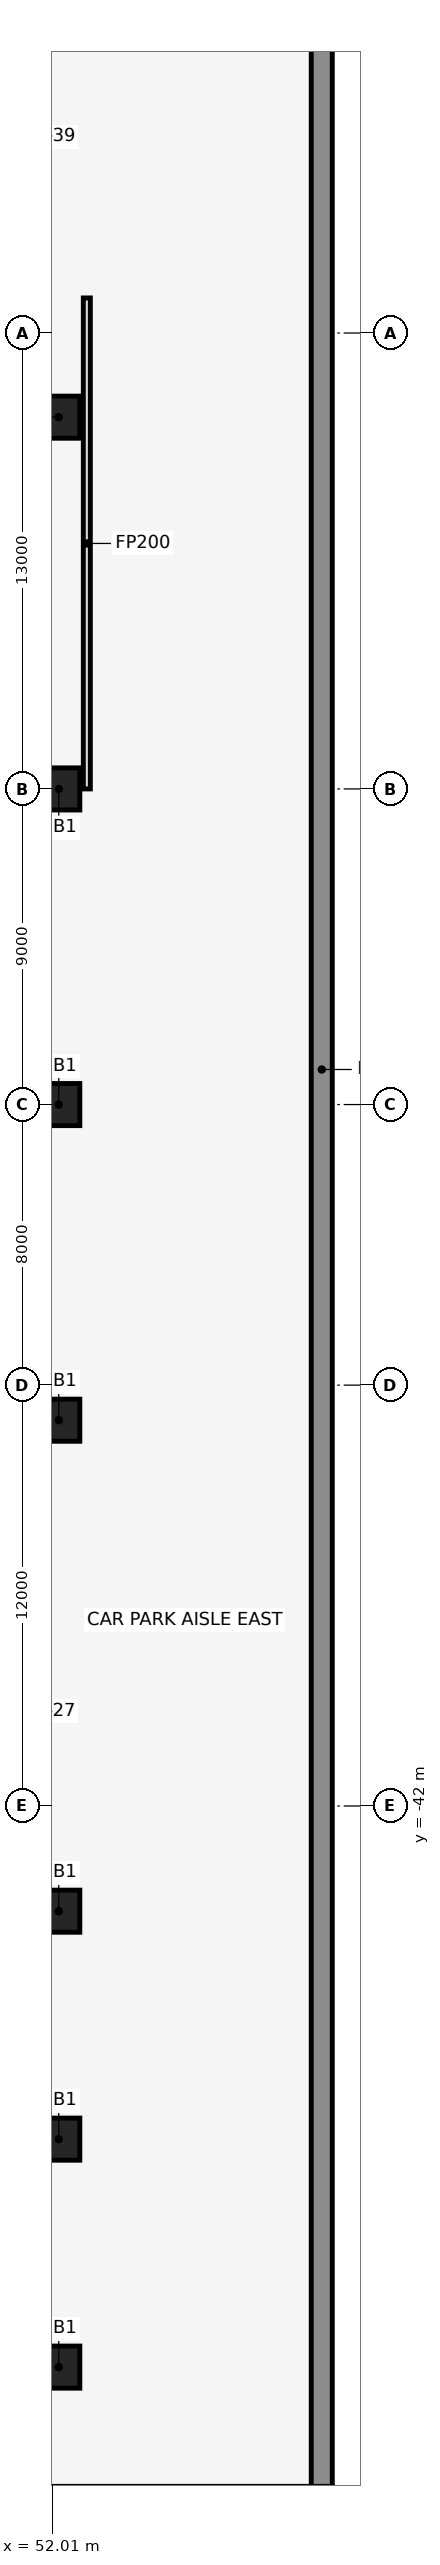
"""IFC4 building model, lengths in metres.
Left out: names, types, materials, properties, quantities, classifications, styles, units other than length and angle.
Written with IfcOpenShell. Run it as: python <this file> out.ifc"""

import sys

from ifc_helpers import new_model, si_unit, direction, frame, frame_2d, origin, origin_2d, place, context, subcontext, project, spatial, rectangle, extrude, element, save


model = new_model("IFC4")
c1 = context("Model", 3, precision=1e-05, world=origin(), true_north=direction((0.0, 1.0)))
c2 = subcontext(c1, "Body", "Model", "MODEL_VIEW")
j1 = project(units=[si_unit("LENGTHUNIT", "METRE"), si_unit("PLANEANGLEUNIT", "RADIAN")], contexts=[c1])
p1 = place(None, origin())
s1 = spatial("IfcSite", under=j1, at=p1, CompositionType="ELEMENT")
p2 = place(p1, origin())
s2 = spatial("IfcBuilding", under=s1, at=p2, CompositionType="ELEMENT")
p3 = place(p2, frame((0.0, 0.0, -10.0)))
s3 = spatial("IfcBuildingStorey", under=s2, at=p3, CompositionType="ELEMENT", Elevation=-10.0)
for number, where, z_axis, x_axis in (
    (1, (52.2, -2.4, 0.0), (0.0, 0.0, 1.0), (1.0, 0.0, 0.0)),
    (2, (52.2, -13.0, 0.0), (0.0, 0.0, 1.0), (1.0, 0.0, 0.0)),
    (3, (52.2, -22.0, 0.0), (0.0, 0.0, 1.0), (1.0, 0.0, 0.0)),
    (4, (52.2, -31.0, 0.0), (0.0, 0.0, 1.0), (1.0, 0.0, 0.0)),
    (5, (52.2, -45.0, 0.0), (0.0, 0.0, 1.0), (1.0, 0.0, 0.0)),
    (6, (52.2, -51.5, 0.0), (0.0, 0.0, 1.0), (1.0, 0.0, 0.0)),
    (7, (52.2, -58.0, 0.0), (0.0, 0.0, 1.0), (1.0, 0.0, 0.0)),
):
    element("IfcColumn", number, at=place(p3, frame(where, z_axis=z_axis, x_axis=x_axis)), inside=s3, PredefinedType="COLUMN", context=c2, shape_type="SweptSolid", body=[
        extrude(rectangle(XDim=1.2, YDim=1.2, at=origin_2d()), origin(), (0.0, 0.0, 1.0), 5.0),
    ])
p4 = place(p3, frame((59.7, -61.4, 0.0), z_axis=(0.0, 0.0, 1.0), x_axis=(0.0, 1.0, 0.0)))
e8 = element("IfcWall", 8, at=p4, inside=s3, PredefinedType="SOLIDWALL", context=c2, shape_type="SweptSolid", body=[
    extrude(rectangle(XDim=80.8, YDim=0.6, at=frame_2d((40.4, 0.0))), origin(), (0.0, 0.0, 1.0), 5.0),
])
p5 = place(p3, frame((53.0, -13.0, 0.0), z_axis=(0.0, 0.0, 1.0), x_axis=(0.0, 1.0, 0.0)))
e9 = element("IfcWall", 9, at=p5, inside=s3, PredefinedType="PARTITIONING", context=c2, shape_type="SweptSolid", body=[
    extrude(rectangle(XDim=14.0, YDim=0.2, at=frame_2d((7.0, 0.0))), origin(), (0.0, 0.0, 1.0), 4.7),
])
save(model, sys.argv[1])
